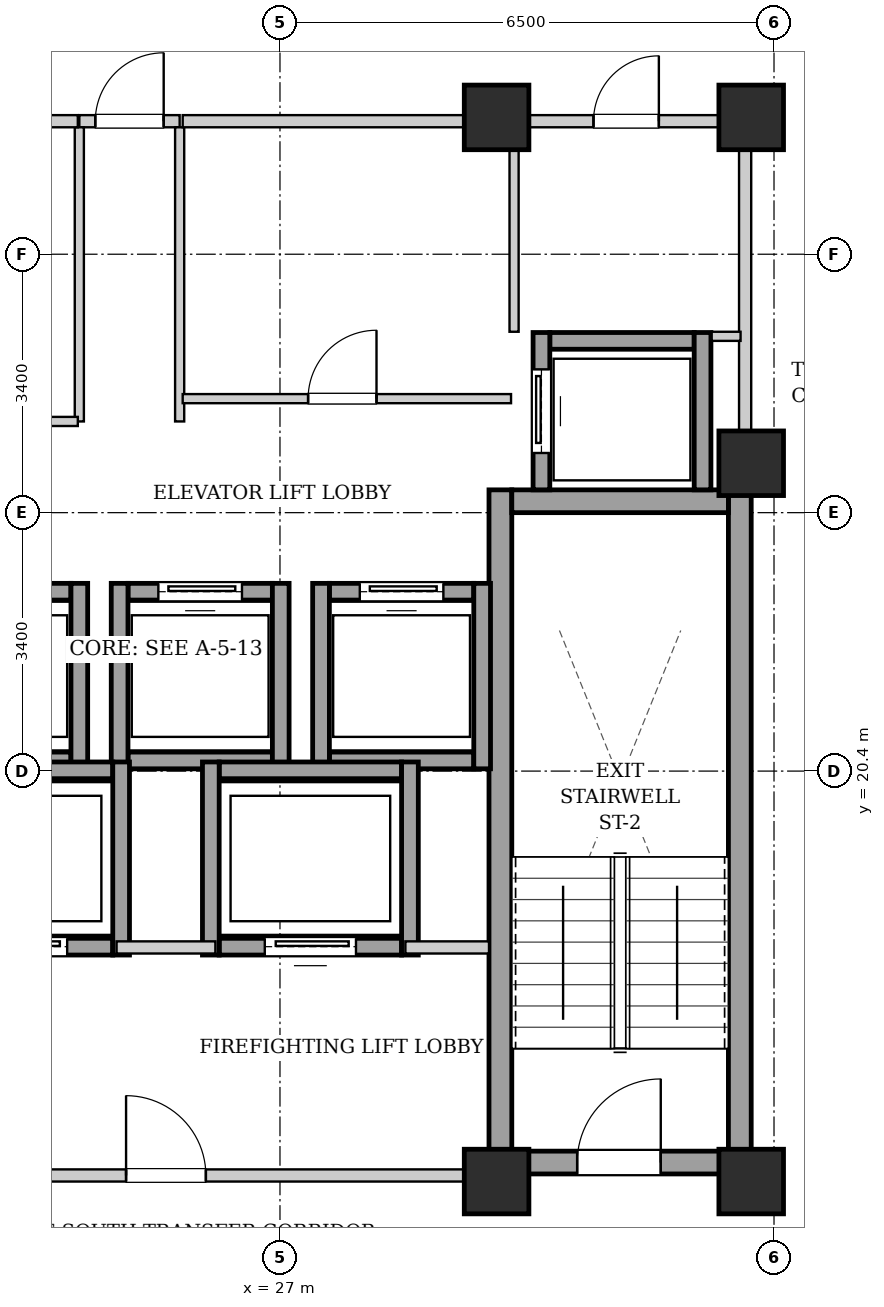
"""IFC4 building model, lengths in metres.
Left out: names, types, materials, properties, quantities, classifications, styles, units other than length and angle.
Written with IfcOpenShell. Run it as: python <this file> out.ifc"""

import sys

from ifc_helpers import new_model, si_unit, direction, frame, frame_2d, origin, origin_2d, place, context, subcontext, project, spatial, rectangle, extrude, element, fill, save


model = new_model("IFC4")
c1 = context("Model", 3, precision=1e-05, world=origin(), true_north=direction((0.0, 1.0)))
c2 = subcontext(c1, "Body", "Model", "MODEL_VIEW")
j1 = project(units=[si_unit("LENGTHUNIT", "METRE"), si_unit("PLANEANGLEUNIT", "RADIAN")], contexts=[c1])
p1 = place(None, origin())
s1 = spatial("IfcSite", under=j1, at=p1, CompositionType="ELEMENT")
p2 = place(p1, origin())
s2 = spatial("IfcBuilding", under=s1, at=p2, CompositionType="ELEMENT")
p3 = place(p2, frame((0.0, 0.0, 174.4)))
s3 = spatial("IfcBuildingStorey", under=s2, at=p3, CompositionType="ELEMENT", Elevation=174.4)
for number, where, z_axis, x_axis in (
    (1, (29.85, 15.0, 0.0), (0.0, 0.0, 1.0), (1.0, 0.0, 0.0)),
    (2, (33.2, 15.0, 0.0), (0.0, 0.0, 1.0), (1.0, 0.0, 0.0)),
    (3, (29.85, 29.0, 0.0), (0.0, 0.0, 1.0), (1.0, 0.0, 0.0)),
    (4, (33.2, 29.0, 0.0), (0.0, 0.0, 1.0), (1.0, 0.0, 0.0)),
    (5, (33.2, 24.45, 0.0), (0.0, 0.0, 1.0), (1.0, 0.0, 0.0)),
):
    element("IfcColumn", number, at=place(p3, frame(where, z_axis=z_axis, x_axis=x_axis)), inside=s3, PredefinedType="COLUMN", context=c2, shape_type="SweptSolid", body=[
        extrude(rectangle(XDim=0.85, YDim=0.85, at=origin_2d()), origin(), (0.0, 0.0, 1.0), 3.3),
    ])
for number, where, z_axis, x_axis in (
    (6, (29.9, 15.1, 0.0), (0.0, 0.0, 1.0), (0.0, 1.0, 0.0)),
    (7, (33.05, 15.1, 0.0), (0.0, 0.0, 1.0), (0.0, 1.0, 0.0)),
):
    element("IfcWall", number, at=place(p3, frame(where, z_axis=z_axis, x_axis=x_axis)), inside=s3, PredefinedType="SHEAR", context=c2, shape_type="SweptSolid", body=[
        extrude(rectangle(XDim=9.0, YDim=0.3, at=frame_2d((4.5, 0.0))), origin(), (0.0, 0.0, 1.0), 3.04),
    ])
p4 = place(p3, frame((30.05, 23.95, 0.0), z_axis=(0.0, 0.0, 1.0), x_axis=(1.0, 0.0, 0.0)))
e8 = element("IfcWall", 8, at=p4, inside=s3, PredefinedType="SHEAR", context=c2, shape_type="SweptSolid", body=[
    extrude(rectangle(XDim=2.85, YDim=0.3, at=frame_2d((1.425, 0.0))), origin(), (0.0, 0.0, 1.0), 3.04),
])
p5 = place(p3, frame((30.05, 15.25, 0.0), z_axis=(0.0, 0.0, 1.0), x_axis=(1.0, 0.0, 0.0)))
e9 = element("IfcWall", 9, at=p5, inside=s3, PredefinedType="SHEAR", context=c2, shape_type="SweptSolid", body=[
    extrude(rectangle(XDim=2.85, YDim=0.3, at=frame_2d((1.425, 0.0))), origin(), (0.0, 0.0, 1.0), 3.04),
])
p6 = place(p5, frame((0.86, 0.0, 0.0)))
e10 = element("IfcOpeningElement", 10, at=p6, cuts=e9, PredefinedType="OPENING", context=c2, shape_type="SweptSolid", body=[
    extrude(rectangle(XDim=1.1, YDim=2.05, at=frame_2d((0.55, 1.025))), frame((0.0, 0.16, 0.0), z_axis=(0.0, -1.0, 0.0), x_axis=(1.0, 0.0, 0.0)), (0.0, 0.0, 1.0), 0.32),
])
p7 = place(p3, frame((22.35, 20.54, 0.0), z_axis=(0.0, 0.0, 1.0), x_axis=(1.0, 0.0, 0.0)))
e11 = element("IfcWall", 11, at=p7, inside=s3, PredefinedType="SHEAR", context=c2, shape_type="SweptSolid", body=[
    extrude(rectangle(XDim=1.9, YDim=0.22, at=frame_2d((0.95, 0.0))), origin(), (0.0, 0.0, 1.0), 3.04),
])
p8 = place(p3, frame((22.35, 22.76, 0.0), z_axis=(0.0, 0.0, 1.0), x_axis=(1.0, 0.0, 0.0)))
e12 = element("IfcWall", 12, at=p8, inside=s3, PredefinedType="SHEAR", context=c2, shape_type="SweptSolid", body=[
    extrude(rectangle(XDim=1.9, YDim=0.22, at=frame_2d((0.95, 0.0))), origin(), (0.0, 0.0, 1.0), 3.04),
])
p9 = place(p8, frame((0.4, 0.0, 0.0)))
e13 = element("IfcOpeningElement", 13, at=p9, cuts=e12, PredefinedType="OPENING", context=c2, shape_type="SweptSolid", body=[
    extrude(rectangle(XDim=1.1, YDim=2.15, at=frame_2d((0.55, 1.075))), frame((0.0, 0.12, 0.0), z_axis=(0.0, -1.0, 0.0), x_axis=(1.0, 0.0, 0.0)), (0.0, 0.0, 1.0), 0.24),
])
p10 = place(p3, frame((24.36, 20.43, 0.0), z_axis=(0.0, 0.0, 1.0), x_axis=(0.0, 1.0, 0.0)))
e14 = element("IfcWall", 14, at=p10, inside=s3, PredefinedType="SHEAR", context=c2, shape_type="SweptSolid", body=[
    extrude(rectangle(XDim=2.44, YDim=0.22, at=frame_2d((1.22, 0.0))), origin(), (0.0, 0.0, 1.0), 3.04),
])
p11 = place(p3, frame((25.0, 20.54, 0.0), z_axis=(0.0, 0.0, 1.0), x_axis=(1.0, 0.0, 0.0)))
e15 = element("IfcWall", 15, at=p11, inside=s3, PredefinedType="SHEAR", context=c2, shape_type="SweptSolid", body=[
    extrude(rectangle(XDim=1.9, YDim=0.22, at=frame_2d((0.95, 0.0))), origin(), (0.0, 0.0, 1.0), 3.04),
])
p12 = place(p3, frame((25.0, 22.76, 0.0), z_axis=(0.0, 0.0, 1.0), x_axis=(1.0, 0.0, 0.0)))
e16 = element("IfcWall", 16, at=p12, inside=s3, PredefinedType="SHEAR", context=c2, shape_type="SweptSolid", body=[
    extrude(rectangle(XDim=1.9, YDim=0.22, at=frame_2d((0.95, 0.0))), origin(), (0.0, 0.0, 1.0), 3.04),
])
p13 = place(p12, frame((0.4, 0.0, 0.0)))
e17 = element("IfcOpeningElement", 17, at=p13, cuts=e16, PredefinedType="OPENING", context=c2, shape_type="SweptSolid", body=[
    extrude(rectangle(XDim=1.1, YDim=2.15, at=frame_2d((0.55, 1.075))), frame((0.0, 0.12, 0.0), z_axis=(0.0, -1.0, 0.0), x_axis=(1.0, 0.0, 0.0)), (0.0, 0.0, 1.0), 0.24),
])
for number, where, z_axis, x_axis in (
    (18, (24.89, 20.43, 0.0), (0.0, 0.0, 1.0), (0.0, 1.0, 0.0)),
    (19, (27.01, 20.43, 0.0), (0.0, 0.0, 1.0), (0.0, 1.0, 0.0)),
):
    element("IfcWall", number, at=place(p3, frame(where, z_axis=z_axis, x_axis=x_axis)), inside=s3, PredefinedType="SHEAR", context=c2, shape_type="SweptSolid", body=[
        extrude(rectangle(XDim=2.44, YDim=0.22, at=frame_2d((1.22, 0.0))), origin(), (0.0, 0.0, 1.0), 3.04),
    ])
p14 = place(p3, frame((27.65, 20.54, 0.0), z_axis=(0.0, 0.0, 1.0), x_axis=(1.0, 0.0, 0.0)))
e20 = element("IfcWall", 20, at=p14, inside=s3, PredefinedType="SHEAR", context=c2, shape_type="SweptSolid", body=[
    extrude(rectangle(XDim=1.9, YDim=0.22, at=frame_2d((0.95, 0.0))), origin(), (0.0, 0.0, 1.0), 3.04),
])
p15 = place(p3, frame((27.65, 22.76, 0.0), z_axis=(0.0, 0.0, 1.0), x_axis=(1.0, 0.0, 0.0)))
e21 = element("IfcWall", 21, at=p15, inside=s3, PredefinedType="SHEAR", context=c2, shape_type="SweptSolid", body=[
    extrude(rectangle(XDim=1.9, YDim=0.22, at=frame_2d((0.95, 0.0))), origin(), (0.0, 0.0, 1.0), 3.04),
])
p16 = place(p15, frame((0.4, 0.0, 0.0)))
e22 = element("IfcOpeningElement", 22, at=p16, cuts=e21, PredefinedType="OPENING", context=c2, shape_type="SweptSolid", body=[
    extrude(rectangle(XDim=1.1, YDim=2.15, at=frame_2d((0.55, 1.075))), frame((0.0, 0.12, 0.0), z_axis=(0.0, -1.0, 0.0), x_axis=(1.0, 0.0, 0.0)), (0.0, 0.0, 1.0), 0.24),
])
for number, where, z_axis, x_axis in (
    (23, (27.54, 20.43, 0.0), (0.0, 0.0, 1.0), (0.0, 1.0, 0.0)),
    (24, (29.66, 20.43, 0.0), (0.0, 0.0, 1.0), (0.0, 1.0, 0.0)),
):
    element("IfcWall", number, at=place(p3, frame(where, z_axis=z_axis, x_axis=x_axis)), inside=s3, PredefinedType="SHEAR", context=c2, shape_type="SweptSolid", body=[
        extrude(rectangle(XDim=2.44, YDim=0.22, at=frame_2d((1.22, 0.0))), origin(), (0.0, 0.0, 1.0), 3.04),
    ])
p17 = place(p3, frame((30.55, 26.06, 0.0), z_axis=(0.0, 0.0, 1.0), x_axis=(1.0, 0.0, 0.0)))
e25 = element("IfcWall", 25, at=p17, inside=s3, PredefinedType="SHEAR", context=c2, shape_type="SweptSolid", body=[
    extrude(rectangle(XDim=1.9, YDim=0.22, at=frame_2d((0.95, 0.0))), origin(), (0.0, 0.0, 1.0), 3.04),
])
p18 = place(p3, frame((30.44, 24.1, 0.0), z_axis=(0.0, 0.0, 1.0), x_axis=(0.0, 1.0, 0.0)))
e26 = element("IfcWall", 26, at=p18, inside=s3, PredefinedType="SHEAR", context=c2, shape_type="SweptSolid", body=[
    extrude(rectangle(XDim=2.07, YDim=0.22, at=frame_2d((1.035, 0.0))), origin(), (0.0, 0.0, 1.0), 3.04),
])
p19 = place(p18, frame((0.485, 0.0, 0.0)))
e27 = element("IfcOpeningElement", 27, at=p19, cuts=e26, PredefinedType="OPENING", context=c2, shape_type="SweptSolid", body=[
    extrude(rectangle(XDim=1.1, YDim=2.15, at=frame_2d((0.55, 1.075))), frame((0.0, 0.12, 0.0), z_axis=(0.0, -1.0, 0.0), x_axis=(1.0, 0.0, 0.0)), (0.0, 0.0, 1.0), 0.24),
])
p20 = place(p3, frame((32.56, 24.1, 0.0), z_axis=(0.0, 0.0, 1.0), x_axis=(0.0, 1.0, 0.0)))
e28 = element("IfcWall", 28, at=p20, inside=s3, PredefinedType="SHEAR", context=c2, shape_type="SweptSolid", body=[
    extrude(rectangle(XDim=2.07, YDim=0.22, at=frame_2d((1.035, 0.0))), origin(), (0.0, 0.0, 1.0), 3.04),
])
p21 = place(p3, frame((22.4, 18.09, 0.0), z_axis=(0.0, 0.0, 1.0), x_axis=(1.0, 0.0, 0.0)))
e29 = element("IfcWall", 29, at=p21, inside=s3, PredefinedType="SHEAR", context=c2, shape_type="SweptSolid", body=[
    extrude(rectangle(XDim=2.4, YDim=0.22, at=frame_2d((1.2, 0.0))), origin(), (0.0, 0.0, 1.0), 3.04),
])
p22 = place(p21, frame((0.6, 0.0, 0.0)))
e30 = element("IfcOpeningElement", 30, at=p22, cuts=e29, PredefinedType="OPENING", context=c2, shape_type="SweptSolid", body=[
    extrude(rectangle(XDim=1.2, YDim=2.15, at=frame_2d((0.6, 1.075))), frame((0.0, 0.12, 0.0), z_axis=(0.0, -1.0, 0.0), x_axis=(1.0, 0.0, 0.0)), (0.0, 0.0, 1.0), 0.24),
])
p23 = place(p3, frame((22.4, 20.41, 0.0), z_axis=(0.0, 0.0, 1.0), x_axis=(1.0, 0.0, 0.0)))
e31 = element("IfcWall", 31, at=p23, inside=s3, PredefinedType="SHEAR", context=c2, shape_type="SweptSolid", body=[
    extrude(rectangle(XDim=2.4, YDim=0.22, at=frame_2d((1.2, 0.0))), origin(), (0.0, 0.0, 1.0), 3.04),
])
p24 = place(p3, frame((24.91, 17.98, 0.0), z_axis=(0.0, 0.0, 1.0), x_axis=(0.0, 1.0, 0.0)))
e32 = element("IfcWall", 32, at=p24, inside=s3, PredefinedType="SHEAR", context=c2, shape_type="SweptSolid", body=[
    extrude(rectangle(XDim=2.54, YDim=0.22, at=frame_2d((1.27, 0.0))), origin(), (0.0, 0.0, 1.0), 3.04),
])
p25 = place(p3, frame((26.2, 18.09, 0.0), z_axis=(0.0, 0.0, 1.0), x_axis=(1.0, 0.0, 0.0)))
e33 = element("IfcWall", 33, at=p25, inside=s3, PredefinedType="SHEAR", context=c2, shape_type="SweptSolid", body=[
    extrude(rectangle(XDim=2.4, YDim=0.22, at=frame_2d((1.2, 0.0))), origin(), (0.0, 0.0, 1.0), 3.04),
])
p26 = place(p25, frame((0.6, 0.0, 0.0)))
e34 = element("IfcOpeningElement", 34, at=p26, cuts=e33, PredefinedType="OPENING", context=c2, shape_type="SweptSolid", body=[
    extrude(rectangle(XDim=1.2, YDim=2.15, at=frame_2d((0.6, 1.075))), frame((0.0, 0.12, 0.0), z_axis=(0.0, -1.0, 0.0), x_axis=(1.0, 0.0, 0.0)), (0.0, 0.0, 1.0), 0.24),
])
p27 = place(p3, frame((26.2, 20.41, 0.0), z_axis=(0.0, 0.0, 1.0), x_axis=(1.0, 0.0, 0.0)))
e35 = element("IfcWall", 35, at=p27, inside=s3, PredefinedType="SHEAR", context=c2, shape_type="SweptSolid", body=[
    extrude(rectangle(XDim=2.4, YDim=0.22, at=frame_2d((1.2, 0.0))), origin(), (0.0, 0.0, 1.0), 3.04),
])
for number, where, z_axis, x_axis in (
    (36, (26.09, 17.98, 0.0), (0.0, 0.0, 1.0), (0.0, 1.0, 0.0)),
    (37, (28.71, 17.98, 0.0), (0.0, 0.0, 1.0), (0.0, 1.0, 0.0)),
):
    element("IfcWall", number, at=place(p3, frame(where, z_axis=z_axis, x_axis=x_axis)), inside=s3, PredefinedType="SHEAR", context=c2, shape_type="SweptSolid", body=[
        extrude(rectangle(XDim=2.54, YDim=0.22, at=frame_2d((1.27, 0.0))), origin(), (0.0, 0.0, 1.0), 3.04),
    ])
p28 = place(p3, frame((21.25, 15.08, 0.0), z_axis=(0.0, 0.0, 1.0), x_axis=(1.0, 0.0, 0.0)))
e38 = element("IfcWall", 38, at=p28, inside=s3, PredefinedType="PARTITIONING", context=c2, shape_type="SweptSolid", body=[
    extrude(rectangle(XDim=8.5, YDim=0.16, at=frame_2d((4.25, 0.0))), origin(), (0.0, 0.0, 1.0), 2.556),
])
p29 = place(p28, frame((3.725, 0.0, 0.0)))
e39 = element("IfcOpeningElement", 39, at=p29, cuts=e38, PredefinedType="OPENING", context=c2, shape_type="SweptSolid", body=[
    extrude(rectangle(XDim=1.05, YDim=2.05, at=frame_2d((0.525, 1.025))), frame((0.0, 0.09, 0.0), z_axis=(0.0, -1.0, 0.0), x_axis=(1.0, 0.0, 0.0)), (0.0, 0.0, 1.0), 0.18),
])
p30 = place(p3, frame((24.85, 18.08, 0.0), z_axis=(0.0, 0.0, 1.0), x_axis=(1.0, 0.0, 0.0)))
e40 = element("IfcWall", 40, at=p30, inside=s3, PredefinedType="PARTITIONING", context=c2, shape_type="SweptSolid", body=[
    extrude(rectangle(XDim=1.3, YDim=0.16, at=frame_2d((0.65, 0.0))), origin(), (0.0, 0.0, 1.0), 3.04),
])
p31 = place(p3, frame((28.65, 18.08, 0.0), z_axis=(0.0, 0.0, 1.0), x_axis=(1.0, 0.0, 0.0)))
e41 = element("IfcWall", 41, at=p31, inside=s3, PredefinedType="PARTITIONING", context=c2, shape_type="SweptSolid", body=[
    extrude(rectangle(XDim=1.1, YDim=0.16, at=frame_2d((0.55, 0.0))), origin(), (0.0, 0.0, 1.0), 3.04),
])
p32 = place(p3, frame((33.12, 24.12, 0.0), z_axis=(0.0, 0.0, 1.0), x_axis=(0.0, 1.0, 0.0)))
e42 = element("IfcWall", 42, at=p32, inside=s3, PredefinedType="PARTITIONING", context=c2, shape_type="SweptSolid", body=[
    extrude(rectangle(XDim=4.76, YDim=0.16, at=frame_2d((2.38, 0.0))), origin(), (0.0, 0.0, 1.0), 3.04),
])
p33 = place(p3, frame((24.36, 28.95, 0.0), z_axis=(0.0, 0.0, 1.0), x_axis=(1.0, 0.0, 0.0)))
e43 = element("IfcWall", 43, at=p33, inside=s3, PredefinedType="PARTITIONING", context=c2, shape_type="SweptSolid", body=[
    extrude(rectangle(XDim=1.32, YDim=0.16, at=frame_2d((0.66, 0.0))), origin(), (0.0, 0.0, 1.0), 2.556),
])
p34 = place(p33, frame((0.21, 0.0, 0.0)))
e44 = element("IfcOpeningElement", 44, at=p34, cuts=e43, PredefinedType="OPENING", context=c2, shape_type="SweptSolid", body=[
    extrude(rectangle(XDim=0.9, YDim=2.05, at=frame_2d((0.45, 1.025))), frame((0.0, 0.09, 0.0), z_axis=(0.0, -1.0, 0.0), x_axis=(1.0, 0.0, 0.0)), (0.0, 0.0, 1.0), 0.18),
])
for number, where, z_axis, x_axis in (
    (45, (24.36, 25.0, 0.0), (0.0, 0.0, 1.0), (0.0, 1.0, 0.0)),
    (46, (25.68, 25.0, 0.0), (0.0, 0.0, 1.0), (0.0, 1.0, 0.0)),
):
    element("IfcWall", number, at=place(p3, frame(where, z_axis=z_axis, x_axis=x_axis)), inside=s3, PredefinedType="PARTITIONING", context=c2, shape_type="SweptSolid", body=[
        extrude(rectangle(XDim=3.87, YDim=0.12, at=frame_2d((1.935, 0.0))), origin(), (0.0, 0.0, 1.0), 3.04),
    ])
p35 = place(p3, frame((30.08, 26.18, 0.0), z_axis=(0.0, 0.0, 1.0), x_axis=(0.0, 1.0, 0.0)))
e47 = element("IfcWall", 47, at=p35, inside=s3, PredefinedType="PARTITIONING", context=c2, shape_type="SweptSolid", body=[
    extrude(rectangle(XDim=2.68, YDim=0.12, at=frame_2d((1.34, 0.0))), origin(), (0.0, 0.0, 1.0), 3.04),
])
p36 = place(p3, frame((32.68, 26.12, 0.0), z_axis=(0.0, 0.0, 1.0), x_axis=(1.0, 0.0, 0.0)))
e48 = element("IfcWall", 48, at=p36, inside=s3, PredefinedType="PARTITIONING", context=c2, shape_type="SweptSolid", body=[
    extrude(rectangle(XDim=0.38, YDim=0.12, at=frame_2d((0.19, 0.0))), origin(), (0.0, 0.0, 1.0), 3.04),
])
p37 = place(p3, frame((30.08, 28.95, 0.0), z_axis=(0.0, 0.0, 1.0), x_axis=(1.0, 0.0, 0.0)))
e49 = element("IfcWall", 49, at=p37, inside=s3, PredefinedType="PARTITIONING", context=c2, shape_type="SweptSolid", body=[
    extrude(rectangle(XDim=2.96, YDim=0.16, at=frame_2d((1.48, 0.0))), origin(), (0.0, 0.0, 1.0), 3.04),
])
p38 = place(p37, frame((1.045, 0.0, 0.0)))
e50 = element("IfcOpeningElement", 50, at=p38, cuts=e49, PredefinedType="OPENING", context=c2, shape_type="SweptSolid", body=[
    extrude(rectangle(XDim=0.86, YDim=2.05, at=frame_2d((0.43, 1.025))), frame((0.0, 0.09, 0.0), z_axis=(0.0, -1.0, 0.0), x_axis=(1.0, 0.0, 0.0)), (0.0, 0.0, 1.0), 0.18),
])
p39 = place(p3, frame((22.3, 25.0, 0.0), z_axis=(0.0, 0.0, 1.0), x_axis=(1.0, 0.0, 0.0)))
e51 = element("IfcWall", 51, at=p39, inside=s3, PredefinedType="PARTITIONING", context=c2, shape_type="SweptSolid", body=[
    extrude(rectangle(XDim=2.04, YDim=0.12, at=frame_2d((1.02, 0.0))), origin(), (0.0, 0.0, 1.0), 3.04),
])
p40 = place(p3, frame((22.28, 28.95, 0.0), z_axis=(0.0, 0.0, 1.0), x_axis=(1.0, 0.0, 0.0)))
e52 = element("IfcWall", 52, at=p40, inside=s3, PredefinedType="PARTITIONING", context=c2, shape_type="SweptSolid", body=[
    extrude(rectangle(XDim=2.06, YDim=0.16, at=frame_2d((1.03, 0.0))), origin(), (0.0, 0.0, 1.0), 2.556),
])
p41 = place(p40, frame((0.62, 0.0, 0.0)))
e53 = element("IfcOpeningElement", 53, at=p41, cuts=e52, PredefinedType="OPENING", context=c2, shape_type="SweptSolid", body=[
    extrude(rectangle(XDim=0.86, YDim=2.05, at=frame_2d((0.43, 1.025))), frame((0.0, 0.09, 0.0), z_axis=(0.0, -1.0, 0.0), x_axis=(1.0, 0.0, 0.0)), (0.0, 0.0, 1.0), 0.18),
])
p42 = place(p3, frame((25.72, 28.95, 0.0), z_axis=(0.0, 0.0, 1.0), x_axis=(1.0, 0.0, 0.0)))
e54 = element("IfcWall", 54, at=p42, inside=s3, PredefinedType="PARTITIONING", context=c2, shape_type="SweptSolid", body=[
    extrude(rectangle(XDim=4.32, YDim=0.16, at=frame_2d((2.16, 0.0))), origin(), (0.0, 0.0, 1.0), 2.556),
])
p43 = place(p3, frame((25.72, 25.3, 0.0), z_axis=(0.0, 0.0, 1.0), x_axis=(1.0, 0.0, 0.0)))
e55 = element("IfcWall", 55, at=p43, inside=s3, PredefinedType="PARTITIONING", context=c2, shape_type="SweptSolid", body=[
    extrude(rectangle(XDim=4.32, YDim=0.12, at=frame_2d((2.16, 0.0))), origin(), (0.0, 0.0, 1.0), 3.04),
])
p44 = place(p43, frame((1.65, 0.0, 0.0)))
e56 = element("IfcOpeningElement", 56, at=p44, cuts=e55, PredefinedType="OPENING", context=c2, shape_type="SweptSolid", body=[
    extrude(rectangle(XDim=0.9, YDim=2.05, at=frame_2d((0.45, 1.025))), frame((0.0, 0.07, 0.0), z_axis=(0.0, -1.0, 0.0), x_axis=(1.0, 0.0, 0.0)), (0.0, 0.0, 1.0), 0.14),
])
p45 = place(p6, origin())
e57 = element("IfcDoor", 57, at=p45, inside=s3, OperationType="SINGLE_SWING_RIGHT", PredefinedType="DOOR", context=c2, shape_type="SweptSolid", body=[
    extrude(rectangle(XDim=1.1, YDim=2.05, at=frame_2d((0.55, 1.025))), frame((0.0, 0.025, 0.0), z_axis=(0.0, -1.0, 0.0), x_axis=(1.0, 0.0, 0.0)), (0.0, 0.0, 1.0), 0.05),
])
fill(e10, e57)
p46 = place(p13, origin())
e58 = element("IfcDoor", 58, at=p46, inside=s3, OperationType="SLIDING_TO_LEFT", PredefinedType="DOOR", context=c2, shape_type="SweptSolid", body=[
    extrude(rectangle(XDim=1.1, YDim=2.15, at=frame_2d((0.55, 1.075))), frame((0.0, 0.025, 0.0), z_axis=(0.0, -1.0, 0.0), x_axis=(1.0, 0.0, 0.0)), (0.0, 0.0, 1.0), 0.05),
])
fill(e17, e58)
p47 = place(p16, origin())
e59 = element("IfcDoor", 59, at=p47, inside=s3, OperationType="SLIDING_TO_LEFT", PredefinedType="DOOR", context=c2, shape_type="SweptSolid", body=[
    extrude(rectangle(XDim=1.1, YDim=2.15, at=frame_2d((0.55, 1.075))), frame((0.0, 0.025, 0.0), z_axis=(0.0, -1.0, 0.0), x_axis=(1.0, 0.0, 0.0)), (0.0, 0.0, 1.0), 0.05),
])
fill(e22, e59)
p48 = place(p19, origin())
e60 = element("IfcDoor", 60, at=p48, inside=s3, OperationType="SLIDING_TO_LEFT", PredefinedType="DOOR", context=c2, shape_type="SweptSolid", body=[
    extrude(rectangle(XDim=1.1, YDim=2.15, at=frame_2d((0.55, 1.075))), frame((0.0, 0.025, 0.0), z_axis=(0.0, -1.0, 0.0), x_axis=(1.0, 0.0, 0.0)), (0.0, 0.0, 1.0), 0.05),
])
fill(e27, e60)
p49 = place(p22, origin())
e61 = element("IfcDoor", 61, at=p49, inside=s3, OperationType="SLIDING_TO_LEFT", PredefinedType="DOOR", context=c2, shape_type="SweptSolid", body=[
    extrude(rectangle(XDim=1.2, YDim=2.15, at=frame_2d((0.6, 1.075))), frame((0.0, 0.025, 0.0), z_axis=(0.0, -1.0, 0.0), x_axis=(1.0, 0.0, 0.0)), (0.0, 0.0, 1.0), 0.05),
])
fill(e30, e61)
p50 = place(p26, origin())
e62 = element("IfcDoor", 62, at=p50, inside=s3, OperationType="SLIDING_TO_LEFT", PredefinedType="DOOR", context=c2, shape_type="SweptSolid", body=[
    extrude(rectangle(XDim=1.2, YDim=2.15, at=frame_2d((0.6, 1.075))), frame((0.0, 0.025, 0.0), z_axis=(0.0, -1.0, 0.0), x_axis=(1.0, 0.0, 0.0)), (0.0, 0.0, 1.0), 0.05),
])
fill(e34, e62)
p51 = place(p29, origin())
e63 = element("IfcDoor", 63, at=p51, inside=s3, OperationType="SINGLE_SWING_LEFT", PredefinedType="DOOR", context=c2, shape_type="SweptSolid", body=[
    extrude(rectangle(XDim=1.05, YDim=2.05, at=frame_2d((0.525, 1.025))), frame((0.0, 0.025, 0.0), z_axis=(0.0, -1.0, 0.0), x_axis=(1.0, 0.0, 0.0)), (0.0, 0.0, 1.0), 0.05),
])
fill(e39, e63)
p52 = place(p34, origin())
e64 = element("IfcDoor", 64, at=p52, inside=s3, OperationType="SINGLE_SWING_RIGHT", PredefinedType="DOOR", context=c2, shape_type="SweptSolid", body=[
    extrude(rectangle(XDim=0.9, YDim=2.05, at=frame_2d((0.45, 1.025))), frame((0.0, 0.025, 0.0), z_axis=(0.0, -1.0, 0.0), x_axis=(1.0, 0.0, 0.0)), (0.0, 0.0, 1.0), 0.05),
])
fill(e44, e64)
p53 = place(p38, origin())
e65 = element("IfcDoor", 65, at=p53, inside=s3, OperationType="SINGLE_SWING_RIGHT", PredefinedType="DOOR", context=c2, shape_type="SweptSolid", body=[
    extrude(rectangle(XDim=0.86, YDim=2.05, at=frame_2d((0.43, 1.025))), frame((0.0, 0.025, 0.0), z_axis=(0.0, -1.0, 0.0), x_axis=(1.0, 0.0, 0.0)), (0.0, 0.0, 1.0), 0.05),
])
fill(e50, e65)
p54 = place(p44, origin())
e66 = element("IfcDoor", 66, at=p54, inside=s3, OperationType="SINGLE_SWING_RIGHT", PredefinedType="DOOR", context=c2, shape_type="SweptSolid", body=[
    extrude(rectangle(XDim=0.9, YDim=2.05, at=frame_2d((0.45, 1.025))), frame((0.0, 0.025, 0.0), z_axis=(0.0, -1.0, 0.0), x_axis=(1.0, 0.0, 0.0)), (0.0, 0.0, 1.0), 0.05),
])
fill(e56, e66)
save(model, sys.argv[1])
